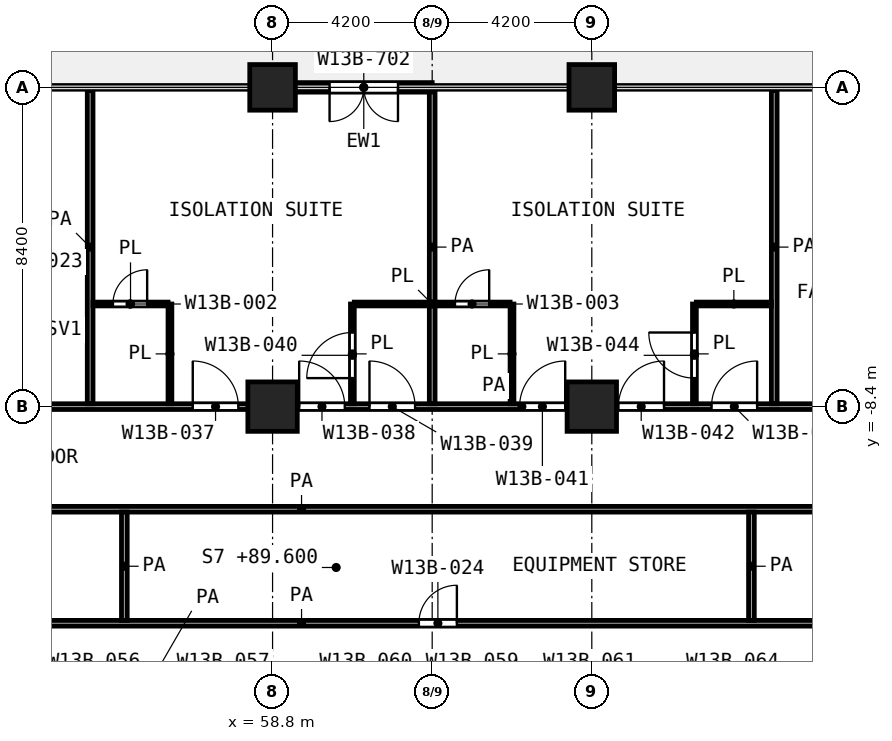
"""IFC4 building model, lengths in metres.
Left out: names, types, materials, properties, quantities, classifications, styles, units other than length and angle.
Written with IfcOpenShell. Run it as: python <this file> out.ifc"""

import sys

from ifc_helpers import new_model, si_unit, direction, frame, frame_2d, origin, origin_2d, place, context, subcontext, project, spatial, rectangle, extrude, element, fill, save


model = new_model("IFC4")
c1 = context("Model", 3, precision=1e-05, world=origin(), true_north=direction((0.0, 1.0)))
c2 = subcontext(c1, "Body", "Model", "MODEL_VIEW")
j1 = project(units=[si_unit("LENGTHUNIT", "METRE"), si_unit("PLANEANGLEUNIT", "RADIAN")], contexts=[c1])
p1 = place(None, origin())
s1 = spatial("IfcSite", under=j1, at=p1, CompositionType="ELEMENT")
p2 = place(p1, origin())
s2 = spatial("IfcBuilding", under=s1, at=p2, CompositionType="ELEMENT")
p3 = place(p2, frame((0.0, 0.0, 89.6)))
s3 = spatial("IfcBuildingStorey", under=s2, at=p3, CompositionType="ELEMENT", Elevation=89.6)
for number, where, z_axis, x_axis in (
    (1, (58.8, 0.0, 0.0), (0.0, 0.0, 1.0), (1.0, 0.0, 0.0)),
    (2, (67.2, 0.0, 0.0), (0.0, 0.0, 1.0), (1.0, 0.0, 0.0)),
):
    element("IfcColumn", number, at=place(p3, frame(where, z_axis=z_axis, x_axis=x_axis)), inside=s3, PredefinedType="COLUMN", context=c2, shape_type="SweptSolid", body=[
        extrude(rectangle(XDim=1.2, YDim=1.2, at=origin_2d()), origin(), (0.0, 0.0, 1.0), 4.2),
    ])
for number, where, z_axis, x_axis in (
    (3, (58.8, -8.4, 0.0), (0.0, 0.0, 1.0), (1.0, 0.0, 0.0)),
    (4, (67.2, -8.4, 0.0), (0.0, 0.0, 1.0), (1.0, 0.0, 0.0)),
):
    element("IfcColumn", number, at=place(p3, frame(where, z_axis=z_axis, x_axis=x_axis)), inside=s3, PredefinedType="COLUMN", context=c2, shape_type="SweptSolid", body=[
        extrude(rectangle(XDim=1.3, YDim=1.3, at=origin_2d()), origin(), (0.0, 0.0, 1.0), 4.2),
    ])
p4 = place(p3, frame((63.0, 0.0, 0.0), z_axis=(0.0, 0.0, 1.0), x_axis=(-1.0, 0.0, 0.0)))
e5 = element("IfcWall", 5, at=p4, inside=s3, PredefinedType="SOLIDWALL", context=c2, shape_type="SweptSolid", body=[
    extrude(rectangle(XDim=3.6, YDim=0.25, at=frame_2d((1.8, 0.0))), origin(), (0.0, 0.0, 1.0), 3.58),
])
p5 = place(p4, frame((0.9, 0.0, 0.0)))
e6 = element("IfcOpeningElement", 6, at=p5, cuts=e5, PredefinedType="OPENING", context=c2, shape_type="SweptSolid", body=[
    extrude(rectangle(XDim=1.8, YDim=2.1, at=frame_2d((0.9, 1.05))), frame((0.0, 0.135, 0.0), z_axis=(0.0, -1.0, 0.0), x_axis=(1.0, 0.0, 0.0)), (0.0, 0.0, 1.0), 0.27),
])
p6 = place(p3, frame((54.075, -5.7, 0.0), z_axis=(0.0, 0.0, 1.0), x_axis=(1.0, 0.0, 0.0)))
e7 = element("IfcWall", 7, at=p6, inside=s3, PredefinedType="PARTITIONING", context=c2, shape_type="SweptSolid", body=[
    extrude(rectangle(XDim=1.975, YDim=0.1, at=frame_2d((0.988, 0.0))), origin(), (0.0, 0.0, 1.0), 3.7),
])
p7 = place(p6, frame((0.525, 0.0, 0.0)))
e8 = element("IfcOpeningElement", 8, at=p7, cuts=e7, PredefinedType="OPENING", context=c2, shape_type="SweptSolid", body=[
    extrude(rectangle(XDim=0.9, YDim=2.1, at=frame_2d((0.45, 1.05))), frame((0.0, 0.06, 0.0), z_axis=(0.0, -1.0, 0.0), x_axis=(1.0, 0.0, 0.0)), (0.0, 0.0, 1.0), 0.12),
])
p8 = place(p3, frame((60.95, -5.7, 0.0), z_axis=(0.0, 0.0, 1.0), x_axis=(1.0, 0.0, 0.0)))
e9 = element("IfcWall", 9, at=p8, inside=s3, PredefinedType="PARTITIONING", context=c2, shape_type="SweptSolid", body=[
    extrude(rectangle(XDim=4.1, YDim=0.1, at=frame_2d((2.05, 0.0))), origin(), (0.0, 0.0, 1.0), 3.7),
])
p9 = place(p8, frame((2.65, 0.0, 0.0)))
e10 = element("IfcOpeningElement", 10, at=p9, cuts=e9, PredefinedType="OPENING", context=c2, shape_type="SweptSolid", body=[
    extrude(rectangle(XDim=0.9, YDim=2.1, at=frame_2d((0.45, 1.05))), frame((0.0, 0.06, 0.0), z_axis=(0.0, -1.0, 0.0), x_axis=(1.0, 0.0, 0.0)), (0.0, 0.0, 1.0), 0.12),
])
p10 = place(p3, frame((69.95, -5.7, 0.0), z_axis=(0.0, 0.0, 1.0), x_axis=(1.0, 0.0, 0.0)))
e11 = element("IfcWall", 11, at=p10, inside=s3, PredefinedType="PARTITIONING", context=c2, shape_type="SweptSolid", body=[
    extrude(rectangle(XDim=1.975, YDim=0.1, at=frame_2d((0.988, 0.0))), origin(), (0.0, 0.0, 1.0), 3.7),
])
p11 = place(p3, frame((56.1, -8.325, 0.0), z_axis=(0.0, 0.0, 1.0), x_axis=(0.0, 1.0, 0.0)))
e12 = element("IfcWall", 12, at=p11, inside=s3, PredefinedType="PARTITIONING", context=c2, shape_type="SweptSolid", body=[
    extrude(rectangle(XDim=2.625, YDim=0.1, at=frame_2d((1.312, 0.0))), origin(), (0.0, 0.0, 1.0), 3.7),
])
p12 = place(p3, frame((60.9, -8.325, 0.0), z_axis=(0.0, 0.0, 1.0), x_axis=(0.0, 1.0, 0.0)))
e13 = element("IfcWall", 13, at=p12, inside=s3, PredefinedType="PARTITIONING", context=c2, shape_type="SweptSolid", body=[
    extrude(rectangle(XDim=2.625, YDim=0.1, at=frame_2d((1.312, 0.0))), origin(), (0.0, 0.0, 1.0), 3.7),
])
p13 = place(p12, frame((0.675, 0.0, 0.0)))
e14 = element("IfcOpeningElement", 14, at=p13, cuts=e13, PredefinedType="OPENING", context=c2, shape_type="SweptSolid", body=[
    extrude(rectangle(XDim=1.2, YDim=2.1, at=frame_2d((0.6, 1.05))), frame((0.0, 0.06, 0.0), z_axis=(0.0, -1.0, 0.0), x_axis=(1.0, 0.0, 0.0)), (0.0, 0.0, 1.0), 0.12),
])
p14 = place(p3, frame((65.1, -8.325, 0.0), z_axis=(0.0, 0.0, 1.0), x_axis=(0.0, 1.0, 0.0)))
e15 = element("IfcWall", 15, at=p14, inside=s3, PredefinedType="PARTITIONING", context=c2, shape_type="SweptSolid", body=[
    extrude(rectangle(XDim=2.625, YDim=0.1, at=frame_2d((1.312, 0.0))), origin(), (0.0, 0.0, 1.0), 3.7),
])
p15 = place(p3, frame((69.9, -8.325, 0.0), z_axis=(0.0, 0.0, 1.0), x_axis=(0.0, 1.0, 0.0)))
e16 = element("IfcWall", 16, at=p15, inside=s3, PredefinedType="PARTITIONING", context=c2, shape_type="SweptSolid", body=[
    extrude(rectangle(XDim=2.625, YDim=0.1, at=frame_2d((1.312, 0.0))), origin(), (0.0, 0.0, 1.0), 3.7),
])
p16 = place(p15, frame((0.675, 0.0, 0.0)))
e17 = element("IfcOpeningElement", 17, at=p16, cuts=e16, PredefinedType="OPENING", context=c2, shape_type="SweptSolid", body=[
    extrude(rectangle(XDim=1.2, YDim=2.1, at=frame_2d((0.6, 1.05))), frame((0.0, 0.06, 0.0), z_axis=(0.0, -1.0, 0.0), x_axis=(1.0, 0.0, 0.0)), (0.0, 0.0, 1.0), 0.12),
])
p17 = place(p3, frame((42.1, -14.1, 0.0), z_axis=(0.0, 0.0, 1.0), x_axis=(1.0, 0.0, 0.0)))
e18 = element("IfcWall", 18, at=p17, inside=s3, PredefinedType="PARTITIONING", context=c2, shape_type="SweptSolid", body=[
    extrude(rectangle(XDim=34.925, YDim=0.15, at=frame_2d((17.462, 0.0))), origin(), (0.0, 0.0, 1.0), 3.7),
])
p18 = place(p17, frame((20.55, 0.0, 0.0)))
e19 = element("IfcOpeningElement", 19, at=p18, cuts=e18, PredefinedType="OPENING", context=c2, shape_type="SweptSolid", body=[
    extrude(rectangle(XDim=1.0, YDim=2.1, at=frame_2d((0.5, 1.05))), frame((0.0, 0.085, 0.0), z_axis=(0.0, -1.0, 0.0), x_axis=(1.0, 0.0, 0.0)), (0.0, 0.0, 1.0), 0.17),
])
p19 = place(p17, frame((31.65, 0.0, 0.0)))
e20 = element("IfcOpeningElement", 20, at=p19, cuts=e18, PredefinedType="OPENING", context=c2, shape_type="SweptSolid", body=[
    extrude(rectangle(XDim=1.0, YDim=2.1, at=frame_2d((0.5, 1.05))), frame((0.0, 0.085, 0.0), z_axis=(0.0, -1.0, 0.0), x_axis=(1.0, 0.0, 0.0)), (0.0, 0.0, 1.0), 0.17),
])
p20 = place(p3, frame((42.1, -11.1, 0.0), z_axis=(0.0, 0.0, 1.0), x_axis=(1.0, 0.0, 0.0)))
e21 = element("IfcWall", 21, at=p20, inside=s3, PredefinedType="PARTITIONING", context=c2, shape_type="SweptSolid", body=[
    extrude(rectangle(XDim=34.925, YDim=0.15, at=frame_2d((17.462, 0.0))), origin(), (0.0, 0.0, 1.0), 3.7),
])
p21 = place(p20, frame((5.75, 0.0, 0.0)))
e22 = element("IfcOpeningElement", 22, at=p21, cuts=e21, PredefinedType="OPENING", context=c2, shape_type="SweptSolid", body=[
    extrude(rectangle(XDim=1.2, YDim=2.1, at=frame_2d((0.6, 1.05))), frame((0.0, 0.085, 0.0), z_axis=(0.0, -1.0, 0.0), x_axis=(1.0, 0.0, 0.0)), (0.0, 0.0, 1.0), 0.17),
])
p22 = place(p3, frame((51.0, -8.4, 0.0), z_axis=(0.0, 0.0, 1.0), x_axis=(1.0, 0.0, 0.0)))
e23 = element("IfcWall", 23, at=p22, inside=s3, PredefinedType="PARTITIONING", context=c2, shape_type="SweptSolid", body=[
    extrude(rectangle(XDim=28.72, YDim=0.15, at=frame_2d((14.36, 0.0))), origin(), (0.0, 0.0, 1.0), 3.7),
])
p23 = place(p22, frame((5.7, 0.0, 0.0)))
e24 = element("IfcOpeningElement", 24, at=p23, cuts=e23, PredefinedType="OPENING", context=c2, shape_type="SweptSolid", body=[
    extrude(rectangle(XDim=1.2, YDim=2.1, at=frame_2d((0.6, 1.05))), frame((0.0, 0.085, 0.0), z_axis=(0.0, -1.0, 0.0), x_axis=(1.0, 0.0, 0.0)), (0.0, 0.0, 1.0), 0.17),
])
p24 = place(p22, frame((8.5, 0.0, 0.0)))
e25 = element("IfcOpeningElement", 25, at=p24, cuts=e23, PredefinedType="OPENING", context=c2, shape_type="SweptSolid", body=[
    extrude(rectangle(XDim=1.2, YDim=2.1, at=frame_2d((0.6, 1.05))), frame((0.0, 0.085, 0.0), z_axis=(0.0, -1.0, 0.0), x_axis=(1.0, 0.0, 0.0)), (0.0, 0.0, 1.0), 0.17),
])
p25 = place(p22, frame((10.35, 0.0, 0.0)))
e26 = element("IfcOpeningElement", 26, at=p25, cuts=e23, PredefinedType="OPENING", context=c2, shape_type="SweptSolid", body=[
    extrude(rectangle(XDim=1.2, YDim=2.1, at=frame_2d((0.6, 1.05))), frame((0.0, 0.085, 0.0), z_axis=(0.0, -1.0, 0.0), x_axis=(1.0, 0.0, 0.0)), (0.0, 0.0, 1.0), 0.17),
])
p26 = place(p22, frame((14.3, 0.0, 0.0)))
e27 = element("IfcOpeningElement", 27, at=p26, cuts=e23, PredefinedType="OPENING", context=c2, shape_type="SweptSolid", body=[
    extrude(rectangle(XDim=1.2, YDim=2.1, at=frame_2d((0.6, 1.05))), frame((0.0, 0.085, 0.0), z_axis=(0.0, -1.0, 0.0), x_axis=(1.0, 0.0, 0.0)), (0.0, 0.0, 1.0), 0.17),
])
p27 = place(p22, frame((16.9, 0.0, 0.0)))
e28 = element("IfcOpeningElement", 28, at=p27, cuts=e23, PredefinedType="OPENING", context=c2, shape_type="SweptSolid", body=[
    extrude(rectangle(XDim=1.2, YDim=2.1, at=frame_2d((0.6, 1.05))), frame((0.0, 0.085, 0.0), z_axis=(0.0, -1.0, 0.0), x_axis=(1.0, 0.0, 0.0)), (0.0, 0.0, 1.0), 0.17),
])
p28 = place(p22, frame((19.35, 0.0, 0.0)))
e29 = element("IfcOpeningElement", 29, at=p28, cuts=e23, PredefinedType="OPENING", context=c2, shape_type="SweptSolid", body=[
    extrude(rectangle(XDim=1.2, YDim=2.1, at=frame_2d((0.6, 1.05))), frame((0.0, 0.085, 0.0), z_axis=(0.0, -1.0, 0.0), x_axis=(1.0, 0.0, 0.0)), (0.0, 0.0, 1.0), 0.17),
])
p29 = place(p22, frame((25.35, 0.0, 0.0)))
e30 = element("IfcOpeningElement", 30, at=p29, cuts=e23, PredefinedType="OPENING", context=c2, shape_type="SweptSolid", body=[
    extrude(rectangle(XDim=1.5, YDim=2.1, at=frame_2d((0.75, 1.05))), frame((0.0, 0.085, 0.0), z_axis=(0.0, -1.0, 0.0), x_axis=(1.0, 0.0, 0.0)), (0.0, 0.0, 1.0), 0.17),
])
p30 = place(p3, frame((54.0, -8.325, 0.0), z_axis=(0.0, 0.0, 1.0), x_axis=(0.0, 1.0, 0.0)))
e31 = element("IfcWall", 31, at=p30, inside=s3, PredefinedType="PARTITIONING", context=c2, shape_type="SweptSolid", body=[
    extrude(rectangle(XDim=8.245, YDim=0.15, at=frame_2d((4.123, 0.0))), origin(), (0.0, 0.0, 1.0), 3.7),
])
p31 = place(p3, frame((54.9, -14.025, 0.0), z_axis=(0.0, 0.0, 1.0), x_axis=(0.0, 1.0, 0.0)))
e32 = element("IfcWall", 32, at=p31, inside=s3, PredefinedType="PARTITIONING", context=c2, shape_type="SweptSolid", body=[
    extrude(rectangle(XDim=2.85, YDim=0.15, at=frame_2d((1.425, 0.0))), origin(), (0.0, 0.0, 1.0), 3.7),
])
p32 = place(p3, frame((63.0, -8.325, 0.0), z_axis=(0.0, 0.0, 1.0), x_axis=(0.0, 1.0, 0.0)))
e33 = element("IfcWall", 33, at=p32, inside=s3, PredefinedType="PARTITIONING", context=c2, shape_type="SweptSolid", body=[
    extrude(rectangle(XDim=8.245, YDim=0.15, at=frame_2d((4.123, 0.0))), origin(), (0.0, 0.0, 1.0), 3.7),
])
p33 = place(p3, frame((71.4, -14.025, 0.0), z_axis=(0.0, 0.0, 1.0), x_axis=(0.0, 1.0, 0.0)))
e34 = element("IfcWall", 34, at=p33, inside=s3, PredefinedType="PARTITIONING", context=c2, shape_type="SweptSolid", body=[
    extrude(rectangle(XDim=2.85, YDim=0.15, at=frame_2d((1.425, 0.0))), origin(), (0.0, 0.0, 1.0), 3.7),
])
p34 = place(p3, frame((72.0, -8.325, 0.0), z_axis=(0.0, 0.0, 1.0), x_axis=(0.0, 1.0, 0.0)))
e35 = element("IfcWall", 35, at=p34, inside=s3, PredefinedType="PARTITIONING", context=c2, shape_type="SweptSolid", body=[
    extrude(rectangle(XDim=8.245, YDim=0.15, at=frame_2d((4.123, 0.0))), origin(), (0.0, 0.0, 1.0), 3.7),
])
p35 = place(p5, origin())
e36 = element("IfcDoor", 36, at=p35, inside=s3, OperationType="DOUBLE_DOOR_SINGLE_SWING", PredefinedType="DOOR", context=c2, shape_type="SweptSolid", body=[
    extrude(rectangle(XDim=1.8, YDim=2.1, at=frame_2d((0.9, 1.05))), frame((0.0, 0.025, 0.0), z_axis=(0.0, -1.0, 0.0), x_axis=(1.0, 0.0, 0.0)), (0.0, 0.0, 1.0), 0.05),
])
fill(e6, e36)
p36 = place(p23, origin())
e37 = element("IfcDoor", 37, at=p36, inside=s3, OperationType="SINGLE_SWING_LEFT", PredefinedType="DOOR", context=c2, shape_type="SweptSolid", body=[
    extrude(rectangle(XDim=1.2, YDim=2.1, at=frame_2d((0.6, 1.05))), frame((0.0, 0.025, 0.0), z_axis=(0.0, -1.0, 0.0), x_axis=(1.0, 0.0, 0.0)), (0.0, 0.0, 1.0), 0.05),
])
fill(e24, e37)
p37 = place(p24, origin())
e38 = element("IfcDoor", 38, at=p37, inside=s3, OperationType="SINGLE_SWING_LEFT", PredefinedType="DOOR", context=c2, shape_type="SweptSolid", body=[
    extrude(rectangle(XDim=1.2, YDim=2.1, at=frame_2d((0.6, 1.05))), frame((0.0, 0.025, 0.0), z_axis=(0.0, -1.0, 0.0), x_axis=(1.0, 0.0, 0.0)), (0.0, 0.0, 1.0), 0.05),
])
fill(e25, e38)
p38 = place(p25, origin())
e39 = element("IfcDoor", 39, at=p38, inside=s3, OperationType="SINGLE_SWING_LEFT", PredefinedType="DOOR", context=c2, shape_type="SweptSolid", body=[
    extrude(rectangle(XDim=1.2, YDim=2.1, at=frame_2d((0.6, 1.05))), frame((0.0, 0.025, 0.0), z_axis=(0.0, -1.0, 0.0), x_axis=(1.0, 0.0, 0.0)), (0.0, 0.0, 1.0), 0.05),
])
fill(e26, e39)
p39 = place(p13, origin())
e40 = element("IfcDoor", 40, at=p39, inside=s3, OperationType="SINGLE_SWING_LEFT", PredefinedType="DOOR", context=c2, shape_type="SweptSolid", body=[
    extrude(rectangle(XDim=1.2, YDim=2.1, at=frame_2d((0.6, 1.05))), frame((0.0, 0.025, 0.0), z_axis=(0.0, -1.0, 0.0), x_axis=(1.0, 0.0, 0.0)), (0.0, 0.0, 1.0), 0.05),
])
fill(e14, e40)
p40 = place(p7, origin())
e41 = element("IfcDoor", 41, at=p40, inside=s3, OperationType="SINGLE_SWING_RIGHT", PredefinedType="DOOR", context=c2, shape_type="SweptSolid", body=[
    extrude(rectangle(XDim=0.9, YDim=2.1, at=frame_2d((0.45, 1.05))), frame((0.0, 0.025, 0.0), z_axis=(0.0, -1.0, 0.0), x_axis=(1.0, 0.0, 0.0)), (0.0, 0.0, 1.0), 0.05),
])
fill(e8, e41)
p41 = place(p26, origin())
e42 = element("IfcDoor", 42, at=p41, inside=s3, OperationType="SINGLE_SWING_RIGHT", PredefinedType="DOOR", context=c2, shape_type="SweptSolid", body=[
    extrude(rectangle(XDim=1.2, YDim=2.1, at=frame_2d((0.6, 1.05))), frame((0.0, 0.025, 0.0), z_axis=(0.0, -1.0, 0.0), x_axis=(1.0, 0.0, 0.0)), (0.0, 0.0, 1.0), 0.05),
])
fill(e27, e42)
p42 = place(p27, origin())
e43 = element("IfcDoor", 43, at=p42, inside=s3, OperationType="SINGLE_SWING_RIGHT", PredefinedType="DOOR", context=c2, shape_type="SweptSolid", body=[
    extrude(rectangle(XDim=1.2, YDim=2.1, at=frame_2d((0.6, 1.05))), frame((0.0, 0.025, 0.0), z_axis=(0.0, -1.0, 0.0), x_axis=(1.0, 0.0, 0.0)), (0.0, 0.0, 1.0), 0.05),
])
fill(e28, e43)
p43 = place(p28, origin())
e44 = element("IfcDoor", 44, at=p43, inside=s3, OperationType="SINGLE_SWING_RIGHT", PredefinedType="DOOR", context=c2, shape_type="SweptSolid", body=[
    extrude(rectangle(XDim=1.2, YDim=2.1, at=frame_2d((0.6, 1.05))), frame((0.0, 0.025, 0.0), z_axis=(0.0, -1.0, 0.0), x_axis=(1.0, 0.0, 0.0)), (0.0, 0.0, 1.0), 0.05),
])
fill(e29, e44)
p44 = place(p16, origin())
e45 = element("IfcDoor", 45, at=p44, inside=s3, OperationType="SINGLE_SWING_RIGHT", PredefinedType="DOOR", context=c2, shape_type="SweptSolid", body=[
    extrude(rectangle(XDim=1.2, YDim=2.1, at=frame_2d((0.6, 1.05))), frame((0.0, 0.025, 0.0), z_axis=(0.0, -1.0, 0.0), x_axis=(1.0, 0.0, 0.0)), (0.0, 0.0, 1.0), 0.05),
])
fill(e17, e45)
p45 = place(p9, origin())
e46 = element("IfcDoor", 46, at=p45, inside=s3, OperationType="SINGLE_SWING_RIGHT", PredefinedType="DOOR", context=c2, shape_type="SweptSolid", body=[
    extrude(rectangle(XDim=0.9, YDim=2.1, at=frame_2d((0.45, 1.05))), frame((0.0, 0.025, 0.0), z_axis=(0.0, -1.0, 0.0), x_axis=(1.0, 0.0, 0.0)), (0.0, 0.0, 1.0), 0.05),
])
fill(e10, e46)
p46 = place(p18, origin())
e47 = element("IfcDoor", 47, at=p46, inside=s3, OperationType="SINGLE_SWING_RIGHT", PredefinedType="DOOR", context=c2, shape_type="SweptSolid", body=[
    extrude(rectangle(XDim=1.0, YDim=2.1, at=frame_2d((0.5, 1.05))), frame((0.0, 0.025, 0.0), z_axis=(0.0, -1.0, 0.0), x_axis=(1.0, 0.0, 0.0)), (0.0, 0.0, 1.0), 0.05),
])
fill(e19, e47)
save(model, sys.argv[1])
